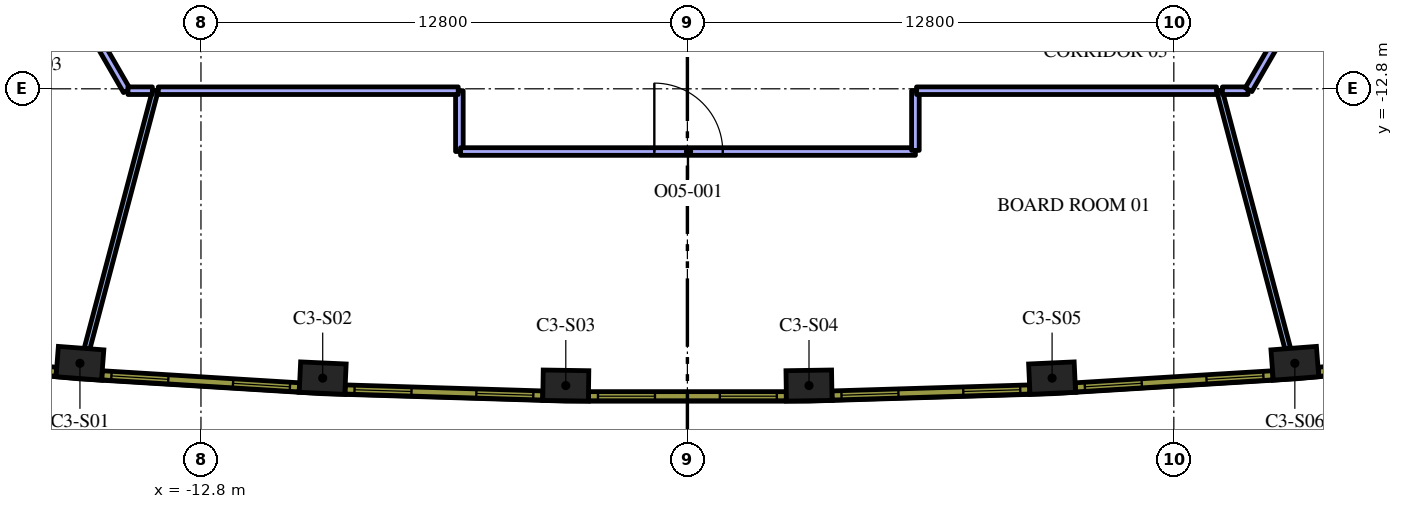
"""IFC4 building model, lengths in metres.
Left out: names, types, materials, properties, quantities, classifications, styles, units other than length and angle.
Written with IfcOpenShell. Run it as: python <this file> out.ifc"""

import sys

from ifc_helpers import new_model, si_unit, direction, frame, frame_2d, origin, origin_2d, place, context, subcontext, project, spatial, rectangle, extrude, element, fill, save


model = new_model("IFC4")
c1 = context("Model", 3, precision=1e-05, world=origin(), true_north=direction((0.0, 1.0)))
c2 = subcontext(c1, "Body", "Model", "MODEL_VIEW")
j1 = project(units=[si_unit("LENGTHUNIT", "METRE"), si_unit("PLANEANGLEUNIT", "RADIAN")], contexts=[c1])
p1 = place(None, origin())
s1 = spatial("IfcSite", under=j1, at=p1, CompositionType="ELEMENT")
p2 = place(p1, origin())
s2 = spatial("IfcBuilding", under=s1, at=p2, CompositionType="ELEMENT")
p3 = place(p2, frame((0.0, 0.0, 192.0)))
s3 = spatial("IfcBuildingStorey", under=s2, at=p3, CompositionType="ELEMENT", Elevation=192.0)
for number, where, z_axis, x_axis in (
    (1, (-15.985, -20.022, 0.0), (0.0, 0.0, 1.0), (0.997, -0.076, 0.0)),
    (2, (-9.597, -20.413, 0.0), (0.0, 0.0, 1.0), (0.999, -0.046, 0.0)),
    (3, (-3.2, -20.608, 0.0), (0.0, 0.0, 1.0), (1.0, -0.015, 0.0)),
    (4, (3.2, -20.608, 0.0), (0.0, 0.0, 1.0), (1.0, 0.015, 0.0)),
    (5, (9.597, -20.413, 0.0), (0.0, 0.0, 1.0), (0.999, 0.046, 0.0)),
    (6, (15.985, -20.022, 0.0), (0.0, 0.0, 1.0), (0.997, 0.076, 0.0)),
):
    element("IfcColumn", number, at=place(p3, frame(where, z_axis=z_axis, x_axis=x_axis)), inside=s3, PredefinedType="COLUMN", context=c2, shape_type="SweptSolid", body=[
        extrude(rectangle(XDim=1.2, YDim=0.8, at=origin_2d()), origin(), (0.0, 0.0, 1.0), 4.2),
    ])
for number, where, z_axis, x_axis in (
    (7, (14.001, -12.85, 0.0), (0.0, 0.0, 1.0), (0.256, -0.967, 0.0)),
    (8, (-15.798, -19.635, 0.0), (0.0, 0.0, 1.0), (0.256, 0.967, 0.0)),
):
    element("IfcWall", number, at=place(p3, frame(where, z_axis=z_axis, x_axis=x_axis)), inside=s3, PredefinedType="PARTITIONING", context=c2, shape_type="SweptSolid", body=[
        extrude(rectangle(XDim=7.019, YDim=0.15, at=frame_2d((3.51, 0.0))), origin(), (0.0, 0.0, 1.0), 3.1),
    ])
p4 = place(p3, frame((-6.0, -12.85, 0.0), z_axis=(0.0, 0.0, 1.0), x_axis=(0.0, -1.0, 0.0)))
e9 = element("IfcWall", 9, at=p4, inside=s3, PredefinedType="PARTITIONING", context=c2, shape_type="SweptSolid", body=[
    extrude(rectangle(XDim=1.6, YDim=0.2, at=frame_2d((0.8, 0.0))), origin(), (0.0, 0.0, 1.0), 3.1),
])
p5 = place(p3, frame((-5.97, -14.45, 0.0), z_axis=(0.0, 0.0, 1.0), x_axis=(1.0, 0.0, 0.0)))
e10 = element("IfcWall", 10, at=p5, inside=s3, PredefinedType="PARTITIONING", context=c2, shape_type="SweptSolid", body=[
    extrude(rectangle(XDim=11.97, YDim=0.2, at=frame_2d((5.985, 0.0))), origin(), (0.0, 0.0, 1.0), 3.1),
])
p6 = place(p5, frame((5.1, 0.0, 0.0)))
e11 = element("IfcOpeningElement", 11, at=p6, cuts=e10, PredefinedType="OPENING", context=c2, shape_type="SweptSolid", body=[
    extrude(rectangle(XDim=1.8, YDim=2.1, at=frame_2d((0.9, 1.05))), frame((0.0, 0.11, 0.0), z_axis=(0.0, -1.0, 0.0), x_axis=(1.0, 0.0, 0.0)), (0.0, 0.0, 1.0), 0.22),
])
p7 = place(p3, frame((6.0, -14.42, 0.0), z_axis=(0.0, 0.0, 1.0), x_axis=(0.0, 1.0, 0.0)))
e12 = element("IfcWall", 12, at=p7, inside=s3, PredefinedType="PARTITIONING", context=c2, shape_type="SweptSolid", body=[
    extrude(rectangle(XDim=1.57, YDim=0.2, at=frame_2d((0.785, 0.0))), origin(), (0.0, 0.0, 1.0), 3.1),
])
for number, where, z_axis, x_axis in (
    (13, (-13.924, -12.85, 0.0), (0.0, 0.0, 1.0), (1.0, 0.0, 0.0)),
    (14, (6.03, -12.85, 0.0), (0.0, 0.0, 1.0), (1.0, 0.0, 0.0)),
):
    element("IfcWall", number, at=place(p3, frame(where, z_axis=z_axis, x_axis=x_axis)), inside=s3, PredefinedType="PARTITIONING", context=c2, shape_type="SweptSolid", body=[
        extrude(rectangle(XDim=7.894, YDim=0.2, at=frame_2d((3.947, 0.0))), origin(), (0.0, 0.0, 1.0), 3.1),
    ])
p8 = place(p3, frame((23.366, -13.491, 0.0), z_axis=(0.0, 0.0, 1.0), x_axis=(-0.866025704444, 0.499999479242, 0.0)))
e15 = element("IfcWall", 15, at=p8, inside=s3, PredefinedType="PARTITIONING", context=c2, shape_type="SweptSolid", body=[
    extrude(rectangle(XDim=7.781, YDim=0.15, at=frame_2d((3.891, 0.0))), origin(), (0.0, 0.0, 1.0), 3.1),
])
p9 = place(p8, frame((3.481, 0.0, 0.0)))
e16 = element("IfcOpeningElement", 16, at=p9, cuts=e15, PredefinedType="OPENING", context=c2, shape_type="SweptSolid", body=[
    extrude(rectangle(XDim=0.9, YDim=2.1, at=frame_2d((0.45, 1.05))), frame((0.0, 0.085, 0.0), z_axis=(0.0, -1.0, 0.0), x_axis=(1.0, 0.0, 0.0)), (0.0, 0.0, 1.0), 0.17),
])
p10 = place(p3, frame((14.079, -12.85, 0.0), z_axis=(0.0, 0.0, 1.0), x_axis=(1.0, 0.0, 0.0)))
e17 = element("IfcWall", 17, at=p10, inside=s3, PredefinedType="PARTITIONING", context=c2, shape_type="SweptSolid", body=[
    extrude(rectangle(XDim=0.673, YDim=0.2, at=frame_2d((0.336, 0.0))), origin(), (0.0, 0.0, 1.0), 3.1),
])
p11 = place(p3, frame((14.766, -12.824, 0.0), z_axis=(0.0, 0.0, 1.0), x_axis=(0.499983176524, 0.866035116605, 0.0)))
e18 = element("IfcWall", 18, at=p11, inside=s3, PredefinedType="PARTITIONING", context=c2, shape_type="SweptSolid", body=[
    extrude(rectangle(XDim=3.648, YDim=0.2, at=frame_2d((1.824, 0.0))), origin(), (0.0, 0.0, 1.0), 3.1),
])
p12 = place(p3, frame((-23.366, -13.491, 0.0), z_axis=(0.0, 0.0, 1.0), x_axis=(0.866025704444, 0.499999479242, 0.0)))
e19 = element("IfcWall", 19, at=p12, inside=s3, PredefinedType="PARTITIONING", context=c2, shape_type="SweptSolid", body=[
    extrude(rectangle(XDim=7.781, YDim=0.15, at=frame_2d((3.891, 0.0))), origin(), (0.0, 0.0, 1.0), 3.1),
])
p13 = place(p3, frame((-16.59, -9.665, 0.0), z_axis=(0.0, 0.0, 1.0), x_axis=(0.499994443168, -0.866028611999, 0.0)))
e20 = element("IfcWall", 20, at=p13, inside=s3, PredefinedType="PARTITIONING", context=c2, shape_type="SweptSolid", body=[
    extrude(rectangle(XDim=3.678, YDim=0.2, at=frame_2d((1.839, 0.0))), origin(), (0.0, 0.0, 1.0), 3.1),
])
p14 = place(p13, frame((1.3, 0.0, 0.0)))
e21 = element("IfcOpeningElement", 21, at=p14, cuts=e20, PredefinedType="OPENING", context=c2, shape_type="SweptSolid", body=[
    extrude(rectangle(XDim=1.0, YDim=2.1, at=frame_2d((0.5, 1.05))), frame((0.0, 0.11, 0.0), z_axis=(0.0, -1.0, 0.0), x_axis=(1.0, 0.0, 0.0)), (0.0, 0.0, 1.0), 0.22),
])
p15 = place(p3, frame((-14.721, -12.85, 0.0), z_axis=(0.0, 0.0, 1.0), x_axis=(1.0, 0.0, 0.0)))
e22 = element("IfcWall", 22, at=p15, inside=s3, PredefinedType="PARTITIONING", context=c2, shape_type="SweptSolid", body=[
    extrude(rectangle(XDim=0.643, YDim=0.2, at=frame_2d((0.321, 0.0))), origin(), (0.0, 0.0, 1.0), 3.1),
])
p16 = place(p3, frame((-21.797, -19.77, 0.0), z_axis=(0.0, 0.0, 1.0), x_axis=(0.995808712151, -0.091460422067, 0.0)))
e23 = element("IfcWall", 23, at=p16, inside=s3, PredefinedType="SOLIDWALL", context=c2, shape_type="SweptSolid", body=[
    extrude(rectangle(XDim=5.213, YDim=0.24, at=frame_2d((2.606, 0.0))), origin(), (0.0, 0.0, 1.0), 3.9),
])
p17 = place(p16, frame((0.221, 0.0, 0.9)))
e24 = element("IfcOpeningElement", 24, at=p17, cuts=e23, PredefinedType="OPENING", context=c2, shape_type="SweptSolid", body=[
    extrude(rectangle(XDim=1.5, YDim=2.55, at=frame_2d((0.75, 1.275))), frame((0.0, 0.13, 0.0), z_axis=(0.0, -1.0, 0.0), x_axis=(1.0, 0.0, 0.0)), (0.0, 0.0, 1.0), 0.26),
])
p18 = place(p16, frame((3.452, 0.0, 0.9)))
e25 = element("IfcOpeningElement", 25, at=p18, cuts=e23, PredefinedType="OPENING", context=c2, shape_type="SweptSolid", body=[
    extrude(rectangle(XDim=1.5, YDim=2.55, at=frame_2d((0.75, 1.275))), frame((0.0, 0.13, 0.0), z_axis=(0.0, -1.0, 0.0), x_axis=(1.0, 0.0, 0.0)), (0.0, 0.0, 1.0), 0.26),
])
p19 = place(p3, frame((-15.405, -20.338, 0.0), z_axis=(0.0, 0.0, 1.0), x_axis=(0.998135294646, -0.061040425794, 0.0)))
e26 = element("IfcWall", 26, at=p19, inside=s3, PredefinedType="SOLIDWALL", context=c2, shape_type="SweptSolid", body=[
    extrude(rectangle(XDim=5.204, YDim=0.24, at=frame_2d((2.602, 0.0))), origin(), (0.0, 0.0, 1.0), 3.9),
])
p20 = place(p19, frame((0.248, 0.0, 0.9)))
e27 = element("IfcOpeningElement", 27, at=p20, cuts=e26, PredefinedType="OPENING", context=c2, shape_type="SweptSolid", body=[
    extrude(rectangle(XDim=1.5, YDim=2.55, at=frame_2d((0.75, 1.275))), frame((0.0, 0.13, 0.0), z_axis=(0.0, -1.0, 0.0), x_axis=(1.0, 0.0, 0.0)), (0.0, 0.0, 1.0), 0.26),
])
p21 = place(p19, frame((3.455, 0.0, 0.9)))
e28 = element("IfcOpeningElement", 28, at=p21, cuts=e26, PredefinedType="OPENING", context=c2, shape_type="SweptSolid", body=[
    extrude(rectangle(XDim=1.5, YDim=2.55, at=frame_2d((0.75, 1.275))), frame((0.0, 0.13, 0.0), z_axis=(0.0, -1.0, 0.0), x_axis=(1.0, 0.0, 0.0)), (0.0, 0.0, 1.0), 0.26),
])
p22 = place(p3, frame((-9.007, -20.711, 0.0), z_axis=(0.0, 0.0, 1.0), x_axis=(0.999533441983, -0.030543384845, 0.0)))
e29 = element("IfcWall", 29, at=p22, inside=s3, PredefinedType="SOLIDWALL", context=c2, shape_type="SweptSolid", body=[
    extrude(rectangle(XDim=5.204, YDim=0.24, at=frame_2d((2.602, 0.0))), origin(), (0.0, 0.0, 1.0), 3.9),
])
p23 = place(p22, frame((0.248, 0.0, 0.9)))
e30 = element("IfcOpeningElement", 30, at=p23, cuts=e29, PredefinedType="OPENING", context=c2, shape_type="SweptSolid", body=[
    extrude(rectangle(XDim=1.5, YDim=2.55, at=frame_2d((0.75, 1.275))), frame((0.0, 0.13, 0.0), z_axis=(0.0, -1.0, 0.0), x_axis=(1.0, 0.0, 0.0)), (0.0, 0.0, 1.0), 0.26),
])
p24 = place(p22, frame((3.455, 0.0, 0.9)))
e31 = element("IfcOpeningElement", 31, at=p24, cuts=e29, PredefinedType="OPENING", context=c2, shape_type="SweptSolid", body=[
    extrude(rectangle(XDim=1.5, YDim=2.55, at=frame_2d((0.75, 1.275))), frame((0.0, 0.13, 0.0), z_axis=(0.0, -1.0, 0.0), x_axis=(1.0, 0.0, 0.0)), (0.0, 0.0, 1.0), 0.26),
])
p25 = place(p3, frame((-2.602, -20.888, 0.0), z_axis=(0.0, 0.0, 1.0), x_axis=(1.0, 0.0, 0.0)))
e32 = element("IfcWall", 32, at=p25, inside=s3, PredefinedType="SOLIDWALL", context=c2, shape_type="SweptSolid", body=[
    extrude(rectangle(XDim=5.204, YDim=0.24, at=frame_2d((2.602, 0.0))), origin(), (0.0, 0.0, 1.0), 3.9),
])
p26 = place(p25, frame((0.248, 0.0, 0.9)))
e33 = element("IfcOpeningElement", 33, at=p26, cuts=e32, PredefinedType="OPENING", context=c2, shape_type="SweptSolid", body=[
    extrude(rectangle(XDim=1.5, YDim=2.55, at=frame_2d((0.75, 1.275))), frame((0.0, 0.13, 0.0), z_axis=(0.0, -1.0, 0.0), x_axis=(1.0, 0.0, 0.0)), (0.0, 0.0, 1.0), 0.26),
])
p27 = place(p25, frame((3.455, 0.0, 0.9)))
e34 = element("IfcOpeningElement", 34, at=p27, cuts=e32, PredefinedType="OPENING", context=c2, shape_type="SweptSolid", body=[
    extrude(rectangle(XDim=1.5, YDim=2.55, at=frame_2d((0.75, 1.275))), frame((0.0, 0.13, 0.0), z_axis=(0.0, -1.0, 0.0), x_axis=(1.0, 0.0, 0.0)), (0.0, 0.0, 1.0), 0.26),
])
p28 = place(p3, frame((3.806, -20.87, 0.0), z_axis=(0.0, 0.0, 1.0), x_axis=(0.999533441983, 0.030543384845, 0.0)))
e35 = element("IfcWall", 35, at=p28, inside=s3, PredefinedType="SOLIDWALL", context=c2, shape_type="SweptSolid", body=[
    extrude(rectangle(XDim=5.204, YDim=0.24, at=frame_2d((2.602, 0.0))), origin(), (0.0, 0.0, 1.0), 3.9),
])
p29 = place(p28, frame((0.248, 0.0, 0.9)))
e36 = element("IfcOpeningElement", 36, at=p29, cuts=e35, PredefinedType="OPENING", context=c2, shape_type="SweptSolid", body=[
    extrude(rectangle(XDim=1.5, YDim=2.55, at=frame_2d((0.75, 1.275))), frame((0.0, 0.13, 0.0), z_axis=(0.0, -1.0, 0.0), x_axis=(1.0, 0.0, 0.0)), (0.0, 0.0, 1.0), 0.26),
])
p30 = place(p28, frame((3.455, 0.0, 0.9)))
e37 = element("IfcOpeningElement", 37, at=p30, cuts=e35, PredefinedType="OPENING", context=c2, shape_type="SweptSolid", body=[
    extrude(rectangle(XDim=1.5, YDim=2.55, at=frame_2d((0.75, 1.275))), frame((0.0, 0.13, 0.0), z_axis=(0.0, -1.0, 0.0), x_axis=(1.0, 0.0, 0.0)), (0.0, 0.0, 1.0), 0.26),
])
p31 = place(p3, frame((10.211, -20.656, 0.0), z_axis=(0.0, 0.0, 1.0), x_axis=(0.998135294646, 0.061040425794, 0.0)))
e38 = element("IfcWall", 38, at=p31, inside=s3, PredefinedType="SOLIDWALL", context=c2, shape_type="SweptSolid", body=[
    extrude(rectangle(XDim=5.204, YDim=0.24, at=frame_2d((2.602, 0.0))), origin(), (0.0, 0.0, 1.0), 3.9),
])
p32 = place(p31, frame((0.248, 0.0, 0.9)))
e39 = element("IfcOpeningElement", 39, at=p32, cuts=e38, PredefinedType="OPENING", context=c2, shape_type="SweptSolid", body=[
    extrude(rectangle(XDim=1.5, YDim=2.55, at=frame_2d((0.75, 1.275))), frame((0.0, 0.13, 0.0), z_axis=(0.0, -1.0, 0.0), x_axis=(1.0, 0.0, 0.0)), (0.0, 0.0, 1.0), 0.26),
])
p33 = place(p31, frame((3.455, 0.0, 0.9)))
e40 = element("IfcOpeningElement", 40, at=p33, cuts=e38, PredefinedType="OPENING", context=c2, shape_type="SweptSolid", body=[
    extrude(rectangle(XDim=1.5, YDim=2.55, at=frame_2d((0.75, 1.275))), frame((0.0, 0.13, 0.0), z_axis=(0.0, -1.0, 0.0), x_axis=(1.0, 0.0, 0.0)), (0.0, 0.0, 1.0), 0.26),
])
p34 = place(p3, frame((16.606, -20.247, 0.0), z_axis=(0.0, 0.0, 1.0), x_axis=(0.995808712151, 0.091460422067, 0.0)))
e41 = element("IfcWall", 41, at=p34, inside=s3, PredefinedType="SOLIDWALL", context=c2, shape_type="SweptSolid", body=[
    extrude(rectangle(XDim=5.213, YDim=0.24, at=frame_2d((2.606, 0.0))), origin(), (0.0, 0.0, 1.0), 3.9),
])
p35 = place(p34, frame((0.261, 0.0, 0.9)))
e42 = element("IfcOpeningElement", 42, at=p35, cuts=e41, PredefinedType="OPENING", context=c2, shape_type="SweptSolid", body=[
    extrude(rectangle(XDim=1.5, YDim=2.55, at=frame_2d((0.75, 1.275))), frame((0.0, 0.13, 0.0), z_axis=(0.0, -1.0, 0.0), x_axis=(1.0, 0.0, 0.0)), (0.0, 0.0, 1.0), 0.26),
])
p36 = place(p34, frame((3.492, 0.0, 0.9)))
e43 = element("IfcOpeningElement", 43, at=p36, cuts=e41, PredefinedType="OPENING", context=c2, shape_type="SweptSolid", body=[
    extrude(rectangle(XDim=1.5, YDim=2.55, at=frame_2d((0.75, 1.275))), frame((0.0, 0.13, 0.0), z_axis=(0.0, -1.0, 0.0), x_axis=(1.0, 0.0, 0.0)), (0.0, 0.0, 1.0), 0.26),
])
p37 = place(p6, origin())
e44 = element("IfcDoor", 44, at=p37, inside=s3, OperationType="DOUBLE_DOOR_SINGLE_SWING", PredefinedType="DOOR", context=c2, shape_type="SweptSolid", body=[
    extrude(rectangle(XDim=1.8, YDim=2.1, at=frame_2d((0.9, 1.05))), frame((0.0, 0.025, 0.0), z_axis=(0.0, -1.0, 0.0), x_axis=(1.0, 0.0, 0.0)), (0.0, 0.0, 1.0), 0.05),
])
fill(e11, e44)
p38 = place(p20, origin())
e45 = element("IfcWindow", 45, at=p38, inside=s3, PartitioningType="SINGLE_PANEL", PredefinedType="WINDOW", context=c2, shape_type="SweptSolid", body=[
    extrude(rectangle(XDim=1.5, YDim=2.55, at=frame_2d((0.75, 1.275))), frame((0.0, 0.04, 0.0), z_axis=(0.0, -1.0, 0.0), x_axis=(1.0, 0.0, 0.0)), (0.0, 0.0, 1.0), 0.06),
])
fill(e27, e45)
p39 = place(p21, origin())
e46 = element("IfcWindow", 46, at=p39, inside=s3, PartitioningType="SINGLE_PANEL", PredefinedType="WINDOW", context=c2, shape_type="SweptSolid", body=[
    extrude(rectangle(XDim=1.5, YDim=2.55, at=frame_2d((0.75, 1.275))), frame((0.0, 0.04, 0.0), z_axis=(0.0, -1.0, 0.0), x_axis=(1.0, 0.0, 0.0)), (0.0, 0.0, 1.0), 0.06),
])
fill(e28, e46)
p40 = place(p23, origin())
e47 = element("IfcWindow", 47, at=p40, inside=s3, PartitioningType="SINGLE_PANEL", PredefinedType="WINDOW", context=c2, shape_type="SweptSolid", body=[
    extrude(rectangle(XDim=1.5, YDim=2.55, at=frame_2d((0.75, 1.275))), frame((0.0, 0.04, 0.0), z_axis=(0.0, -1.0, 0.0), x_axis=(1.0, 0.0, 0.0)), (0.0, 0.0, 1.0), 0.06),
])
fill(e30, e47)
p41 = place(p24, origin())
e48 = element("IfcWindow", 48, at=p41, inside=s3, PartitioningType="SINGLE_PANEL", PredefinedType="WINDOW", context=c2, shape_type="SweptSolid", body=[
    extrude(rectangle(XDim=1.5, YDim=2.55, at=frame_2d((0.75, 1.275))), frame((0.0, 0.04, 0.0), z_axis=(0.0, -1.0, 0.0), x_axis=(1.0, 0.0, 0.0)), (0.0, 0.0, 1.0), 0.06),
])
fill(e31, e48)
p42 = place(p26, origin())
e49 = element("IfcWindow", 49, at=p42, inside=s3, PartitioningType="SINGLE_PANEL", PredefinedType="WINDOW", context=c2, shape_type="SweptSolid", body=[
    extrude(rectangle(XDim=1.5, YDim=2.55, at=frame_2d((0.75, 1.275))), frame((0.0, 0.04, 0.0), z_axis=(0.0, -1.0, 0.0), x_axis=(1.0, 0.0, 0.0)), (0.0, 0.0, 1.0), 0.06),
])
fill(e33, e49)
p43 = place(p27, origin())
e50 = element("IfcWindow", 50, at=p43, inside=s3, PartitioningType="SINGLE_PANEL", PredefinedType="WINDOW", context=c2, shape_type="SweptSolid", body=[
    extrude(rectangle(XDim=1.5, YDim=2.55, at=frame_2d((0.75, 1.275))), frame((0.0, 0.04, 0.0), z_axis=(0.0, -1.0, 0.0), x_axis=(1.0, 0.0, 0.0)), (0.0, 0.0, 1.0), 0.06),
])
fill(e34, e50)
p44 = place(p29, origin())
e51 = element("IfcWindow", 51, at=p44, inside=s3, PartitioningType="SINGLE_PANEL", PredefinedType="WINDOW", context=c2, shape_type="SweptSolid", body=[
    extrude(rectangle(XDim=1.5, YDim=2.55, at=frame_2d((0.75, 1.275))), frame((0.0, 0.04, 0.0), z_axis=(0.0, -1.0, 0.0), x_axis=(1.0, 0.0, 0.0)), (0.0, 0.0, 1.0), 0.06),
])
fill(e36, e51)
p45 = place(p30, origin())
e52 = element("IfcWindow", 52, at=p45, inside=s3, PartitioningType="SINGLE_PANEL", PredefinedType="WINDOW", context=c2, shape_type="SweptSolid", body=[
    extrude(rectangle(XDim=1.5, YDim=2.55, at=frame_2d((0.75, 1.275))), frame((0.0, 0.04, 0.0), z_axis=(0.0, -1.0, 0.0), x_axis=(1.0, 0.0, 0.0)), (0.0, 0.0, 1.0), 0.06),
])
fill(e37, e52)
p46 = place(p32, origin())
e53 = element("IfcWindow", 53, at=p46, inside=s3, PartitioningType="SINGLE_PANEL", PredefinedType="WINDOW", context=c2, shape_type="SweptSolid", body=[
    extrude(rectangle(XDim=1.5, YDim=2.55, at=frame_2d((0.75, 1.275))), frame((0.0, 0.04, 0.0), z_axis=(0.0, -1.0, 0.0), x_axis=(1.0, 0.0, 0.0)), (0.0, 0.0, 1.0), 0.06),
])
fill(e39, e53)
p47 = place(p33, origin())
e54 = element("IfcWindow", 54, at=p47, inside=s3, PartitioningType="SINGLE_PANEL", PredefinedType="WINDOW", context=c2, shape_type="SweptSolid", body=[
    extrude(rectangle(XDim=1.5, YDim=2.55, at=frame_2d((0.75, 1.275))), frame((0.0, 0.04, 0.0), z_axis=(0.0, -1.0, 0.0), x_axis=(1.0, 0.0, 0.0)), (0.0, 0.0, 1.0), 0.06),
])
fill(e40, e54)
save(model, sys.argv[1])
